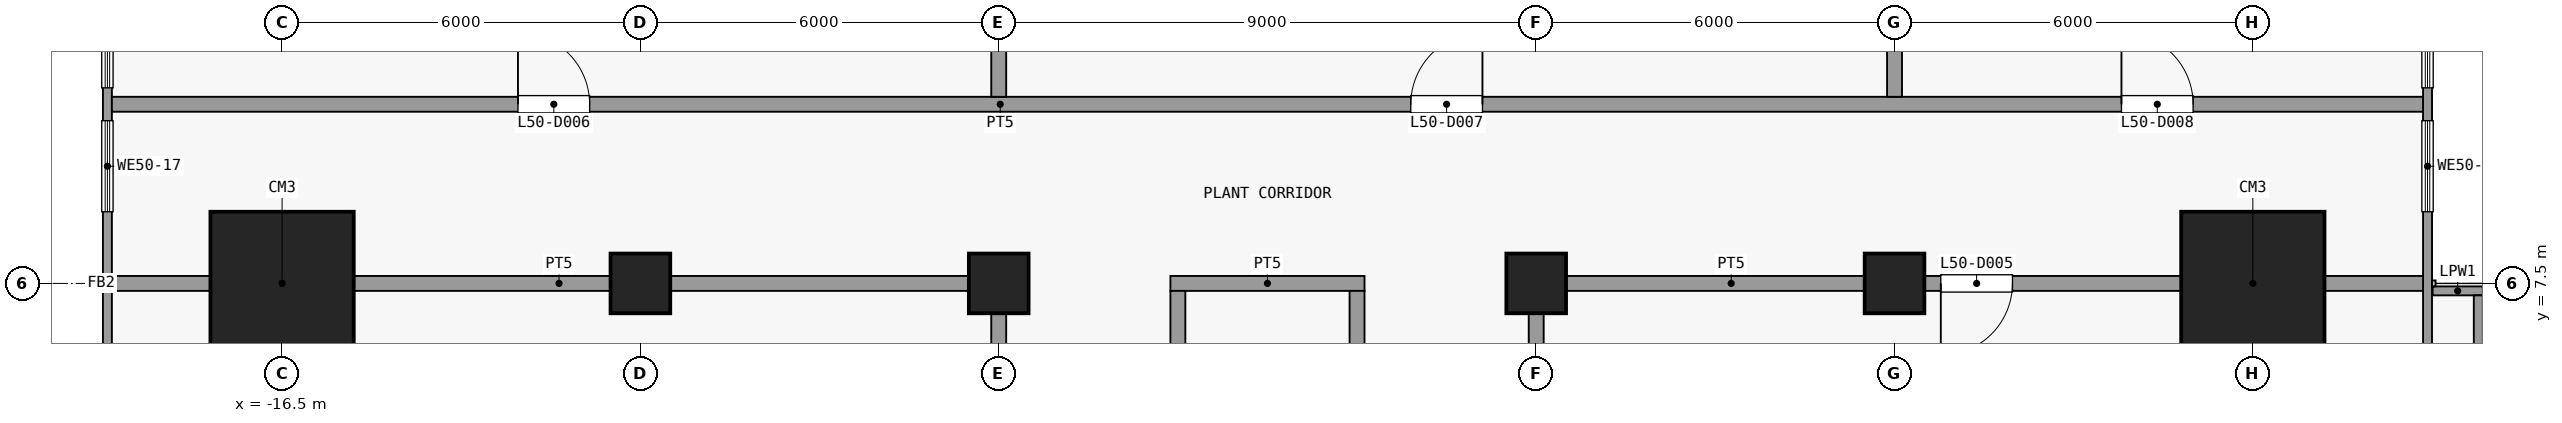
"""IFC4 building model, lengths in metres.
Left out: names, types, materials, properties, quantities, classifications, styles, units other than length and angle.
Written with IfcOpenShell. Run it as: python <this file> out.ifc"""

import sys

from ifc_helpers import new_model, si_unit, direction, frame, frame_2d, origin, origin_2d, place, context, subcontext, project, spatial, rectangle, extrude, element, fill, save


model = new_model("IFC4")
c1 = context("Model", 3, precision=1e-05, world=origin(), true_north=direction((0.0, 1.0)))
c2 = subcontext(c1, "Body", "Model", "MODEL_VIEW")
j1 = project(units=[si_unit("LENGTHUNIT", "METRE"), si_unit("PLANEANGLEUNIT", "RADIAN")], contexts=[c1])
p1 = place(None, origin())
s1 = spatial("IfcSite", under=j1, at=p1, CompositionType="ELEMENT")
p2 = place(p1, origin())
s2 = spatial("IfcBuilding", under=s1, at=p2, CompositionType="ELEMENT")
p3 = place(p2, frame((0.0, 0.0, 199.7)))
s3 = spatial("IfcBuildingStorey", under=s2, at=p3, CompositionType="ELEMENT", Elevation=199.7)
p4 = place(p3, frame((-16.5, 7.5, 0.0), z_axis=(0.0, 0.0, 1.0), x_axis=(1.0, 0.0, 0.0)))
e1 = element("IfcColumn", 1, at=p4, inside=s3, PredefinedType="COLUMN", context=c2, shape_type="SweptSolid", body=[
    extrude(rectangle(XDim=2.4, YDim=2.4, at=origin_2d()), origin(), (0.0, 0.0, 1.0), 5.4),
])
for number, where, z_axis, x_axis in (
    (2, (-10.5, 7.5, 0.0), (0.0, 0.0, 1.0), (1.0, 0.0, 0.0)),
    (3, (-4.5, 7.5, 0.0), (0.0, 0.0, 1.0), (1.0, 0.0, 0.0)),
    (4, (4.5, 7.5, 0.0), (0.0, 0.0, 1.0), (1.0, 0.0, 0.0)),
    (5, (10.5, 7.5, 0.0), (0.0, 0.0, 1.0), (1.0, 0.0, 0.0)),
):
    element("IfcColumn", number, at=place(p3, frame(where, z_axis=z_axis, x_axis=x_axis)), inside=s3, PredefinedType="COLUMN", context=c2, shape_type="SweptSolid", body=[
        extrude(rectangle(XDim=1.0, YDim=1.0, at=origin_2d()), origin(), (0.0, 0.0, 1.0), 5.4),
    ])
p5 = place(p3, frame((16.5, 7.5, 0.0), z_axis=(0.0, 0.0, 1.0), x_axis=(1.0, 0.0, 0.0)))
e6 = element("IfcColumn", 6, at=p5, inside=s3, PredefinedType="COLUMN", context=c2, shape_type="SweptSolid", body=[
    extrude(rectangle(XDim=2.4, YDim=2.4, at=origin_2d()), origin(), (0.0, 0.0, 1.0), 5.4),
])
p6 = place(p3, frame((19.425, 18.35, 0.0), z_axis=(0.0, 0.0, 1.0), x_axis=(0.0, -1.0, 0.0)))
e7 = element("IfcWall", 7, at=p6, inside=s3, PredefinedType="SOLIDWALL", context=c2, shape_type="SweptSolid", body=[
    extrude(rectangle(XDim=39.7, YDim=0.15, at=frame_2d((19.85, 0.0))), origin(), (0.0, 0.0, 1.0), 5.0),
])
p7 = place(p6, frame((33.975, 0.0, 1.2)))
e8 = element("IfcOpeningElement", 8, at=p7, cuts=e7, PredefinedType="OPENING", context=c2, shape_type="SweptSolid", body=[
    extrude(rectangle(XDim=3.6, YDim=3.0, at=frame_2d((1.8, 1.5))), frame((0.0, 0.085, 0.0), z_axis=(0.0, -1.0, 0.0), x_axis=(1.0, 0.0, 0.0)), (0.0, 0.0, 1.0), 0.17),
])
p8 = place(p6, frame((26.525, 0.0, 1.2)))
e9 = element("IfcOpeningElement", 9, at=p8, cuts=e7, PredefinedType="OPENING", context=c2, shape_type="SweptSolid", body=[
    extrude(rectangle(XDim=2.625, YDim=3.0, at=frame_2d((1.312, 1.5))), frame((0.0, 0.085, 0.0), z_axis=(0.0, -1.0, 0.0), x_axis=(1.0, 0.0, 0.0)), (0.0, 0.0, 1.0), 0.17),
])
p9 = place(p6, frame((18.05, 0.0, 1.2)))
e10 = element("IfcOpeningElement", 10, at=p9, cuts=e7, PredefinedType="OPENING", context=c2, shape_type="SweptSolid", body=[
    extrude(rectangle(XDim=3.6, YDim=3.0, at=frame_2d((1.8, 1.5))), frame((0.0, 0.085, 0.0), z_axis=(0.0, -1.0, 0.0), x_axis=(1.0, 0.0, 0.0)), (0.0, 0.0, 1.0), 0.17),
])
p10 = place(p6, frame((12.05, 0.0, 1.2)))
e11 = element("IfcOpeningElement", 11, at=p10, cuts=e7, PredefinedType="OPENING", context=c2, shape_type="SweptSolid", body=[
    extrude(rectangle(XDim=3.6, YDim=3.0, at=frame_2d((1.8, 1.5))), frame((0.0, 0.085, 0.0), z_axis=(0.0, -1.0, 0.0), x_axis=(1.0, 0.0, 0.0)), (0.0, 0.0, 1.0), 0.17),
])
p11 = place(p6, frame((8.125, 0.0, 1.2)))
e12 = element("IfcOpeningElement", 12, at=p11, cuts=e7, PredefinedType="OPENING", context=c2, shape_type="SweptSolid", body=[
    extrude(rectangle(XDim=1.525, YDim=3.0, at=frame_2d((0.762, 1.5))), frame((0.0, 0.085, 0.0), z_axis=(0.0, -1.0, 0.0), x_axis=(1.0, 0.0, 0.0)), (0.0, 0.0, 1.0), 0.17),
])
p12 = place(p6, frame((6.05, 0.0, 1.2)))
e13 = element("IfcOpeningElement", 13, at=p12, cuts=e7, PredefinedType="OPENING", context=c2, shape_type="SweptSolid", body=[
    extrude(rectangle(XDim=1.525, YDim=3.0, at=frame_2d((0.762, 1.5))), frame((0.0, 0.085, 0.0), z_axis=(0.0, -1.0, 0.0), x_axis=(1.0, 0.0, 0.0)), (0.0, 0.0, 1.0), 0.17),
])
p13 = place(p6, frame((0.625, 0.0, 1.2)))
e14 = element("IfcOpeningElement", 14, at=p13, cuts=e7, PredefinedType="OPENING", context=c2, shape_type="SweptSolid", body=[
    extrude(rectangle(XDim=3.6, YDim=3.0, at=frame_2d((1.8, 1.5))), frame((0.0, 0.085, 0.0), z_axis=(0.0, -1.0, 0.0), x_axis=(1.0, 0.0, 0.0)), (0.0, 0.0, 1.0), 0.17),
])
p14 = place(p3, frame((-19.425, -21.35, 0.0), z_axis=(0.0, 0.0, 1.0), x_axis=(0.0, 1.0, 0.0)))
e15 = element("IfcWall", 15, at=p14, inside=s3, PredefinedType="SOLIDWALL", context=c2, shape_type="SweptSolid", body=[
    extrude(rectangle(XDim=39.7, YDim=0.15, at=frame_2d((19.85, 0.0))), origin(), (0.0, 0.0, 1.0), 5.0),
])
p15 = place(p14, frame((2.125, 0.0, 1.2)))
e16 = element("IfcOpeningElement", 16, at=p15, cuts=e15, PredefinedType="OPENING", context=c2, shape_type="SweptSolid", body=[
    extrude(rectangle(XDim=3.6, YDim=3.0, at=frame_2d((1.8, 1.5))), frame((0.0, 0.085, 0.0), z_axis=(0.0, -1.0, 0.0), x_axis=(1.0, 0.0, 0.0)), (0.0, 0.0, 1.0), 0.17),
])
p16 = place(p14, frame((10.55, 0.0, 1.2)))
e17 = element("IfcOpeningElement", 17, at=p16, cuts=e15, PredefinedType="OPENING", context=c2, shape_type="SweptSolid", body=[
    extrude(rectangle(XDim=2.625, YDim=3.0, at=frame_2d((1.312, 1.5))), frame((0.0, 0.085, 0.0), z_axis=(0.0, -1.0, 0.0), x_axis=(1.0, 0.0, 0.0)), (0.0, 0.0, 1.0), 0.17),
])
p17 = place(p14, frame((18.05, 0.0, 1.2)))
e18 = element("IfcOpeningElement", 18, at=p17, cuts=e15, PredefinedType="OPENING", context=c2, shape_type="SweptSolid", body=[
    extrude(rectangle(XDim=3.6, YDim=3.0, at=frame_2d((1.8, 1.5))), frame((0.0, 0.085, 0.0), z_axis=(0.0, -1.0, 0.0), x_axis=(1.0, 0.0, 0.0)), (0.0, 0.0, 1.0), 0.17),
])
p18 = place(p14, frame((24.05, 0.0, 1.2)))
e19 = element("IfcOpeningElement", 19, at=p18, cuts=e15, PredefinedType="OPENING", context=c2, shape_type="SweptSolid", body=[
    extrude(rectangle(XDim=3.6, YDim=3.0, at=frame_2d((1.8, 1.5))), frame((0.0, 0.085, 0.0), z_axis=(0.0, -1.0, 0.0), x_axis=(1.0, 0.0, 0.0)), (0.0, 0.0, 1.0), 0.17),
])
p19 = place(p14, frame((30.05, 0.0, 1.2)))
e20 = element("IfcOpeningElement", 20, at=p19, cuts=e15, PredefinedType="OPENING", context=c2, shape_type="SweptSolid", body=[
    extrude(rectangle(XDim=1.525, YDim=3.0, at=frame_2d((0.762, 1.5))), frame((0.0, 0.085, 0.0), z_axis=(0.0, -1.0, 0.0), x_axis=(1.0, 0.0, 0.0)), (0.0, 0.0, 1.0), 0.17),
])
p20 = place(p14, frame((32.125, 0.0, 1.2)))
e21 = element("IfcOpeningElement", 21, at=p20, cuts=e15, PredefinedType="OPENING", context=c2, shape_type="SweptSolid", body=[
    extrude(rectangle(XDim=1.525, YDim=3.0, at=frame_2d((0.762, 1.5))), frame((0.0, 0.085, 0.0), z_axis=(0.0, -1.0, 0.0), x_axis=(1.0, 0.0, 0.0)), (0.0, 0.0, 1.0), 0.17),
])
p21 = place(p14, frame((35.475, 0.0, 1.2)))
e22 = element("IfcOpeningElement", 22, at=p21, cuts=e15, PredefinedType="OPENING", context=c2, shape_type="SweptSolid", body=[
    extrude(rectangle(XDim=3.6, YDim=3.0, at=frame_2d((1.8, 1.5))), frame((0.0, 0.085, 0.0), z_axis=(0.0, -1.0, 0.0), x_axis=(1.0, 0.0, 0.0)), (0.0, 0.0, 1.0), 0.17),
])
p22 = place(p3, frame((19.51, 7.375, 0.0), z_axis=(0.0, 0.0, 1.0), x_axis=(1.0, 0.0, 0.0)))
e23 = element("IfcWall", 23, at=p22, inside=s3, PredefinedType="PARAPET", context=c2, shape_type="SweptSolid", body=[
    extrude(rectangle(XDim=0.84, YDim=0.15, at=frame_2d((0.42, 0.0))), origin(), (0.0, 0.0, 1.0), 1.15),
])
p23 = place(p3, frame((20.275, 7.3, 0.0), z_axis=(0.0, 0.0, 1.0), x_axis=(0.0, -1.0, 0.0)))
e24 = element("IfcWall", 24, at=p23, inside=s3, PredefinedType="PARAPET", context=c2, shape_type="SweptSolid", body=[
    extrude(rectangle(XDim=5.8, YDim=0.15, at=frame_2d((2.9, 0.0))), origin(), (0.0, 0.0, 1.0), 1.15),
])
p24 = place(p3, frame((-19.35, 7.5, 0.0), z_axis=(0.0, 0.0, 1.0), x_axis=(1.0, 0.0, 0.0)))
e25 = element("IfcWall", 25, at=p24, inside=s3, PredefinedType="PARTITIONING", context=c2, shape_type="SweptSolid", body=[
    extrude(rectangle(XDim=14.975, YDim=0.25, at=frame_2d((7.488, 0.0))), origin(), (0.0, 0.0, 1.0), 5.0),
])
p25 = place(p3, frame((-1.625, 7.5, 0.0), z_axis=(0.0, 0.0, 1.0), x_axis=(1.0, 0.0, 0.0)))
e26 = element("IfcWall", 26, at=p25, inside=s3, PredefinedType="PARTITIONING", context=c2, shape_type="SweptSolid", body=[
    extrude(rectangle(XDim=3.25, YDim=0.25, at=frame_2d((1.625, 0.0))), origin(), (0.0, 0.0, 1.0), 5.0),
])
p26 = place(p3, frame((4.375, 7.5, 0.0), z_axis=(0.0, 0.0, 1.0), x_axis=(1.0, 0.0, 0.0)))
e27 = element("IfcWall", 27, at=p26, inside=s3, PredefinedType="PARTITIONING", context=c2, shape_type="SweptSolid", body=[
    extrude(rectangle(XDim=14.975, YDim=0.25, at=frame_2d((7.488, 0.0))), origin(), (0.0, 0.0, 1.0), 5.0),
])
p27 = place(p26, frame((6.9, 0.0, 0.0)))
e28 = element("IfcOpeningElement", 28, at=p27, cuts=e27, PredefinedType="OPENING", context=c2, shape_type="SweptSolid", body=[
    extrude(rectangle(XDim=1.2, YDim=2.1, at=frame_2d((0.6, 1.05))), frame((0.0, 0.135, 0.0), z_axis=(0.0, -1.0, 0.0), x_axis=(1.0, 0.0, 0.0)), (0.0, 0.0, 1.0), 0.27),
])
p28 = place(p3, frame((-19.35, 10.5, 0.0), z_axis=(0.0, 0.0, 1.0), x_axis=(1.0, 0.0, 0.0)))
e29 = element("IfcWall", 29, at=p28, inside=s3, PredefinedType="PARTITIONING", context=c2, shape_type="SweptSolid", body=[
    extrude(rectangle(XDim=38.7, YDim=0.25, at=frame_2d((19.35, 0.0))), origin(), (0.0, 0.0, 1.0), 5.0),
])
p29 = place(p28, frame((6.8, 0.0, 0.0)))
e30 = element("IfcOpeningElement", 30, at=p29, cuts=e29, PredefinedType="OPENING", context=c2, shape_type="SweptSolid", body=[
    extrude(rectangle(XDim=1.2, YDim=2.1, at=frame_2d((0.6, 1.05))), frame((0.0, 0.135, 0.0), z_axis=(0.0, -1.0, 0.0), x_axis=(1.0, 0.0, 0.0)), (0.0, 0.0, 1.0), 0.27),
])
p30 = place(p28, frame((21.75, 0.0, 0.0)))
e31 = element("IfcOpeningElement", 31, at=p30, cuts=e29, PredefinedType="OPENING", context=c2, shape_type="SweptSolid", body=[
    extrude(rectangle(XDim=1.2, YDim=2.1, at=frame_2d((0.6, 1.05))), frame((0.0, 0.135, 0.0), z_axis=(0.0, -1.0, 0.0), x_axis=(1.0, 0.0, 0.0)), (0.0, 0.0, 1.0), 0.27),
])
p31 = place(p28, frame((33.65, 0.0, 0.0)))
e32 = element("IfcOpeningElement", 32, at=p31, cuts=e29, PredefinedType="OPENING", context=c2, shape_type="SweptSolid", body=[
    extrude(rectangle(XDim=1.2, YDim=2.1, at=frame_2d((0.6, 1.05))), frame((0.0, 0.135, 0.0), z_axis=(0.0, -1.0, 0.0), x_axis=(1.0, 0.0, 0.0)), (0.0, 0.0, 1.0), 0.27),
])
p32 = place(p3, frame((-4.5, -4.375, 0.0), z_axis=(0.0, 0.0, 1.0), x_axis=(0.0, 1.0, 0.0)))
e33 = element("IfcWall", 33, at=p32, inside=s3, PredefinedType="PARTITIONING", context=c2, shape_type="SweptSolid", body=[
    extrude(rectangle(XDim=11.75, YDim=0.25, at=frame_2d((5.875, 0.0))), origin(), (0.0, 0.0, 1.0), 5.0),
])
p33 = place(p3, frame((-4.5, 10.625, 0.0), z_axis=(0.0, 0.0, 1.0), x_axis=(0.0, 1.0, 0.0)))
e34 = element("IfcWall", 34, at=p33, inside=s3, PredefinedType="PARTITIONING", context=c2, shape_type="SweptSolid", body=[
    extrude(rectangle(XDim=11.725, YDim=0.25, at=frame_2d((5.863, 0.0))), origin(), (0.0, 0.0, 1.0), 5.0),
])
p34 = place(p3, frame((-1.5, -4.375, 0.0), z_axis=(0.0, 0.0, 1.0), x_axis=(0.0, 1.0, 0.0)))
e35 = element("IfcWall", 35, at=p34, inside=s3, PredefinedType="PARTITIONING", context=c2, shape_type="SweptSolid", body=[
    extrude(rectangle(XDim=11.75, YDim=0.25, at=frame_2d((5.875, 0.0))), origin(), (0.0, 0.0, 1.0), 5.0),
])
p35 = place(p34, frame((5.3, 0.0, 0.0)))
e36 = element("IfcOpeningElement", 36, at=p35, cuts=e35, PredefinedType="OPENING", context=c2, shape_type="SweptSolid", body=[
    extrude(rectangle(XDim=1.2, YDim=2.1, at=frame_2d((0.6, 1.05))), frame((0.0, 0.135, 0.0), z_axis=(0.0, -1.0, 0.0), x_axis=(1.0, 0.0, 0.0)), (0.0, 0.0, 1.0), 0.27),
])
for number, where, z_axis, x_axis in (
    (37, (1.5, -4.375, 0.0), (0.0, 0.0, 1.0), (0.0, 1.0, 0.0)),
    (38, (4.5, -4.375, 0.0), (0.0, 0.0, 1.0), (0.0, 1.0, 0.0)),
):
    element("IfcWall", number, at=place(p3, frame(where, z_axis=z_axis, x_axis=x_axis)), inside=s3, PredefinedType="PARTITIONING", context=c2, shape_type="SweptSolid", body=[
        extrude(rectangle(XDim=11.75, YDim=0.25, at=frame_2d((5.875, 0.0))), origin(), (0.0, 0.0, 1.0), 5.0),
    ])
p36 = place(p3, frame((10.5, 10.625, 0.0), z_axis=(0.0, 0.0, 1.0), x_axis=(0.0, 1.0, 0.0)))
e39 = element("IfcWall", 39, at=p36, inside=s3, PredefinedType="PARTITIONING", context=c2, shape_type="SweptSolid", body=[
    extrude(rectangle(XDim=11.725, YDim=0.25, at=frame_2d((5.863, 0.0))), origin(), (0.0, 0.0, 1.0), 5.0),
])
p37 = place(p11, origin())
e40 = element("IfcWindow", 40, at=p37, inside=s3, PartitioningType="SINGLE_PANEL", PredefinedType="WINDOW", context=c2, shape_type="SweptSolid", body=[
    extrude(rectangle(XDim=1.525, YDim=3.0, at=frame_2d((0.762, 1.5))), frame((0.0, 0.03, 0.0), z_axis=(0.0, -1.0, 0.0), x_axis=(1.0, 0.0, 0.0)), (0.0, 0.0, 1.0), 0.06),
])
fill(e12, e40)
p38 = place(p12, origin())
e41 = element("IfcWindow", 41, at=p38, inside=s3, PartitioningType="SINGLE_PANEL", PredefinedType="WINDOW", context=c2, shape_type="SweptSolid", body=[
    extrude(rectangle(XDim=1.525, YDim=3.0, at=frame_2d((0.762, 1.5))), frame((0.0, 0.03, 0.0), z_axis=(0.0, -1.0, 0.0), x_axis=(1.0, 0.0, 0.0)), (0.0, 0.0, 1.0), 0.06),
])
fill(e13, e41)
p39 = place(p19, origin())
e42 = element("IfcWindow", 42, at=p39, inside=s3, PartitioningType="SINGLE_PANEL", PredefinedType="WINDOW", context=c2, shape_type="SweptSolid", body=[
    extrude(rectangle(XDim=1.525, YDim=3.0, at=frame_2d((0.762, 1.5))), frame((0.0, 0.03, 0.0), z_axis=(0.0, -1.0, 0.0), x_axis=(1.0, 0.0, 0.0)), (0.0, 0.0, 1.0), 0.06),
])
fill(e20, e42)
p40 = place(p20, origin())
e43 = element("IfcWindow", 43, at=p40, inside=s3, PartitioningType="SINGLE_PANEL", PredefinedType="WINDOW", context=c2, shape_type="SweptSolid", body=[
    extrude(rectangle(XDim=1.525, YDim=3.0, at=frame_2d((0.762, 1.5))), frame((0.0, 0.03, 0.0), z_axis=(0.0, -1.0, 0.0), x_axis=(1.0, 0.0, 0.0)), (0.0, 0.0, 1.0), 0.06),
])
fill(e21, e43)
p41 = place(p27, origin())
e44 = element("IfcDoor", 44, at=p41, inside=s3, OperationType="SINGLE_SWING_LEFT", PredefinedType="DOOR", context=c2, shape_type="SweptSolid", body=[
    extrude(rectangle(XDim=1.2, YDim=2.1, at=frame_2d((0.6, 1.05))), frame((0.0, 0.025, 0.0), z_axis=(0.0, -1.0, 0.0), x_axis=(1.0, 0.0, 0.0)), (0.0, 0.0, 1.0), 0.05),
])
fill(e28, e44)
p42 = place(p29, origin())
e45 = element("IfcDoor", 45, at=p42, inside=s3, OperationType="SINGLE_SWING_RIGHT", PredefinedType="DOOR", context=c2, shape_type="SweptSolid", body=[
    extrude(rectangle(XDim=1.2, YDim=2.1, at=frame_2d((0.6, 1.05))), frame((0.0, 0.025, 0.0), z_axis=(0.0, -1.0, 0.0), x_axis=(1.0, 0.0, 0.0)), (0.0, 0.0, 1.0), 0.05),
])
fill(e30, e45)
p43 = place(p30, origin())
e46 = element("IfcDoor", 46, at=p43, inside=s3, OperationType="SINGLE_SWING_LEFT", PredefinedType="DOOR", context=c2, shape_type="SweptSolid", body=[
    extrude(rectangle(XDim=1.2, YDim=2.1, at=frame_2d((0.6, 1.05))), frame((0.0, 0.025, 0.0), z_axis=(0.0, -1.0, 0.0), x_axis=(1.0, 0.0, 0.0)), (0.0, 0.0, 1.0), 0.05),
])
fill(e31, e46)
p44 = place(p31, origin())
e47 = element("IfcDoor", 47, at=p44, inside=s3, OperationType="SINGLE_SWING_RIGHT", PredefinedType="DOOR", context=c2, shape_type="SweptSolid", body=[
    extrude(rectangle(XDim=1.2, YDim=2.1, at=frame_2d((0.6, 1.05))), frame((0.0, 0.025, 0.0), z_axis=(0.0, -1.0, 0.0), x_axis=(1.0, 0.0, 0.0)), (0.0, 0.0, 1.0), 0.05),
])
fill(e32, e47)
save(model, sys.argv[1])
